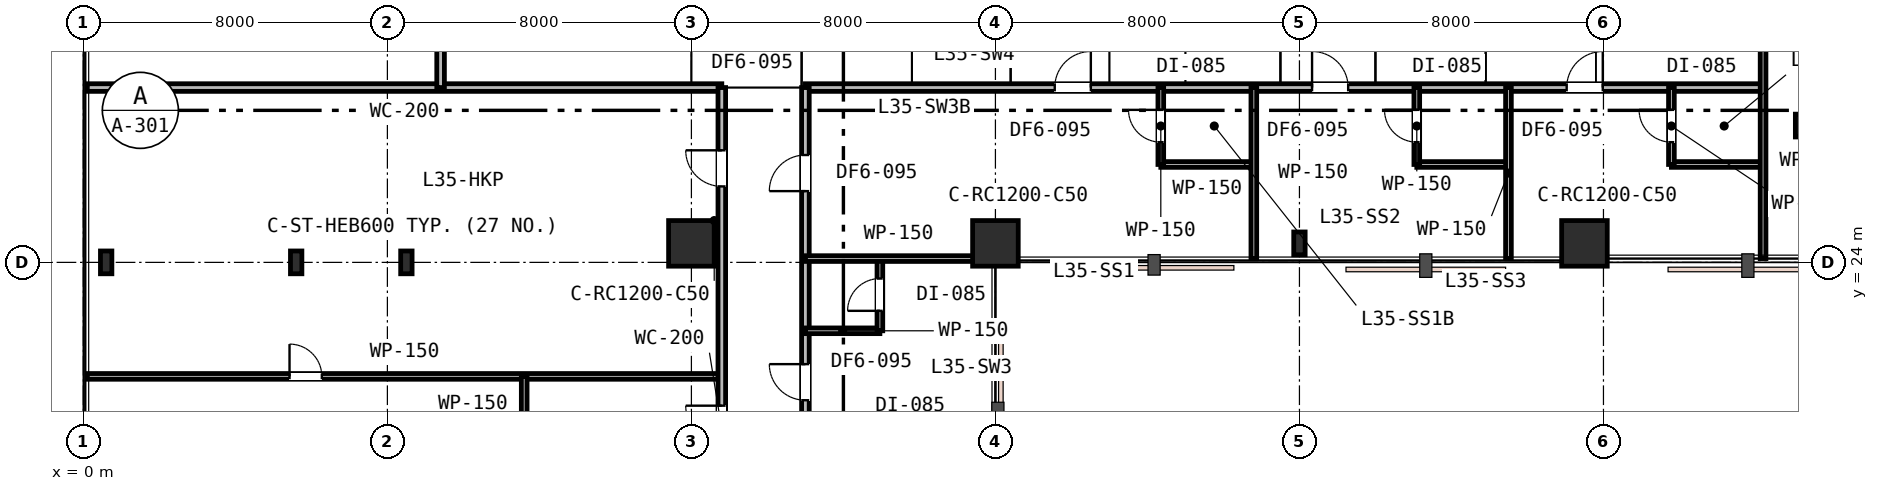
"""IFC4 building model, lengths in metres.
Left out: names, types, materials, properties, quantities, classifications, styles, units other than length and angle.
Written with IfcOpenShell. Run it as: python <this file> out.ifc"""

import sys

from ifc_helpers import new_model, si_unit, direction, frame, frame_2d, origin, origin_2d, place, context, subcontext, project, spatial, rectangle, i_section, extrude, element, fill, save


model = new_model("IFC4")
c1 = context("Model", 3, precision=1e-05, world=origin(), true_north=direction((0.0, 1.0)))
c2 = subcontext(c1, "Body", "Model", "MODEL_VIEW")
j1 = project(units=[si_unit("LENGTHUNIT", "METRE"), si_unit("PLANEANGLEUNIT", "RADIAN")], contexts=[c1])
p1 = place(None, origin())
s1 = spatial("IfcSite", under=j1, at=p1, CompositionType="ELEMENT")
p2 = place(p1, origin())
s2 = spatial("IfcBuilding", under=s1, at=p2, CompositionType="ELEMENT")
p3 = place(p2, frame((0.0, 0.0, 136.8)))
s3 = spatial("IfcBuildingStorey", under=s2, at=p3, CompositionType="ELEMENT", Elevation=136.8)
p4 = place(p3, frame((8.5, 24.0, 0.0), z_axis=(0.0, 0.0, 1.0), x_axis=(1.0, 0.0, 0.0)))
e1 = element("IfcColumn", 1, at=p4, inside=s3, PredefinedType="COLUMN", context=c2, shape_type="SweptSolid", body=[
    extrude(i_section(OverallWidth=0.3, OverallDepth=0.6, WebThickness=0.015, FlangeThickness=0.03, FilletRadius=0.027, at=origin_2d()), origin(), (0.0, 0.0, 1.0), 3.6),
])
for number, where, z_axis, x_axis in (
    (2, (16.0, 24.5, 0.0), (0.0, 0.0, 1.0), (1.0, 0.0, 0.0)),
    (3, (24.0, 24.5, 0.0), (0.0, 0.0, 1.0), (1.0, 0.0, 0.0)),
):
    element("IfcColumn", number, at=place(p3, frame(where, z_axis=z_axis, x_axis=x_axis)), inside=s3, PredefinedType="COLUMN", context=c2, shape_type="SweptSolid", body=[
        extrude(rectangle(XDim=1.2, YDim=1.2, at=origin_2d()), origin(), (0.0, 0.0, 1.0), 3.6),
    ])
p5 = place(p3, frame((32.0, 24.5, 0.0), z_axis=(0.0, 0.0, 1.0), x_axis=(1.0, 0.0, 0.0)))
e4 = element("IfcColumn", 4, at=p5, inside=s3, PredefinedType="COLUMN", context=c2, shape_type="SweptSolid", body=[
    extrude(i_section(OverallWidth=0.3, OverallDepth=0.6, WebThickness=0.015, FlangeThickness=0.03, FilletRadius=0.027, at=origin_2d()), origin(), (0.0, 0.0, 1.0), 3.6),
])
p6 = place(p3, frame((39.5, 24.5, 0.0), z_axis=(0.0, 0.0, 1.0), x_axis=(1.0, 0.0, 0.0)))
e5 = element("IfcColumn", 5, at=p6, inside=s3, PredefinedType="COLUMN", context=c2, shape_type="SweptSolid", body=[
    extrude(rectangle(XDim=1.2, YDim=1.2, at=origin_2d()), origin(), (0.0, 0.0, 1.0), 3.6),
])
for number, where, z_axis, x_axis in (
    (6, (5.6, 24.0, 0.0), (0.0, 0.0, 1.0), (1.0, 0.0, 0.0)),
    (7, (45.2, 27.6, 0.0), (0.0, 0.0, 1.0), (1.0, 0.0, 0.0)),
    (8, (0.6, 24.0, 0.0), (0.0, 0.0, 1.0), (1.0, 0.0, 0.0)),
):
    element("IfcColumn", number, at=place(p3, frame(where, z_axis=z_axis, x_axis=x_axis)), inside=s3, PredefinedType="COLUMN", context=c2, shape_type="SweptSolid", body=[
        extrude(i_section(OverallWidth=0.3, OverallDepth=0.6, WebThickness=0.015, FlangeThickness=0.03, FilletRadius=0.027, at=origin_2d()), origin(), (0.0, 0.0, 1.0), 3.6),
    ])
p7 = place(p3, frame((0.1, 28.6, 0.0), z_axis=(0.0, 0.0, 1.0), x_axis=(1.0, 0.0, 0.0)))
e9 = element("IfcWall", 9, at=p7, inside=s3, PredefinedType="PARTITIONING", context=c2, shape_type="SweptSolid", body=[
    extrude(rectangle(XDim=16.7, YDim=0.2, at=frame_2d((8.35, 0.0))), origin(), (0.0, 0.0, 1.0), 2.93),
])
p8 = place(p3, frame((19.0, 28.6, 0.0), z_axis=(0.0, 0.0, 1.0), x_axis=(1.0, 0.0, 0.0)))
e10 = element("IfcWall", 10, at=p8, inside=s3, PredefinedType="PARTITIONING", context=c2, shape_type="SweptSolid", body=[
    extrude(rectangle(XDim=25.2, YDim=0.2, at=frame_2d((12.6, 0.0))), origin(), (0.0, 0.0, 1.0), 2.93),
])
p9 = place(p8, frame((6.561, 0.0, 0.0)))
e11 = element("IfcOpeningElement", 11, at=p9, cuts=e10, PredefinedType="OPENING", context=c2, shape_type="SweptSolid", body=[
    extrude(rectangle(XDim=0.95, YDim=2.15, at=frame_2d((0.475, 1.075))), frame((0.0, 0.11, 0.0), z_axis=(0.0, -1.0, 0.0), x_axis=(1.0, 0.0, 0.0)), (0.0, 0.0, 1.0), 0.22),
])
p10 = place(p8, frame((13.332, 0.0, 0.0)))
e12 = element("IfcOpeningElement", 12, at=p10, cuts=e10, PredefinedType="OPENING", context=c2, shape_type="SweptSolid", body=[
    extrude(rectangle(XDim=0.95, YDim=2.15, at=frame_2d((0.475, 1.075))), frame((0.0, 0.11, 0.0), z_axis=(0.0, -1.0, 0.0), x_axis=(1.0, 0.0, 0.0)), (0.0, 0.0, 1.0), 0.22),
])
p11 = place(p8, frame((20.032, 0.0, 0.0)))
e13 = element("IfcOpeningElement", 13, at=p11, cuts=e10, PredefinedType="OPENING", context=c2, shape_type="SweptSolid", body=[
    extrude(rectangle(XDim=0.95, YDim=2.15, at=frame_2d((0.475, 1.075))), frame((0.0, 0.11, 0.0), z_axis=(0.0, -1.0, 0.0), x_axis=(1.0, 0.0, 0.0)), (0.0, 0.0, 1.0), 0.22),
])
p12 = place(p3, frame((0.1, 21.0, 0.0), z_axis=(0.0, 0.0, 1.0), x_axis=(1.0, 0.0, 0.0)))
e14 = element("IfcWall", 14, at=p12, inside=s3, PredefinedType="PARTITIONING", context=c2, shape_type="SweptSolid", body=[
    extrude(rectangle(XDim=16.7, YDim=0.15, at=frame_2d((8.35, 0.0))), origin(), (0.0, 0.0, 1.0), 2.93),
])
p13 = place(p12, frame((5.325, 0.0, 0.0)))
e15 = element("IfcOpeningElement", 15, at=p13, cuts=e14, PredefinedType="OPENING", context=c2, shape_type="SweptSolid", body=[
    extrude(rectangle(XDim=0.85, YDim=2.15, at=frame_2d((0.425, 1.075))), frame((0.0, 0.085, 0.0), z_axis=(0.0, -1.0, 0.0), x_axis=(1.0, 0.0, 0.0)), (0.0, 0.0, 1.0), 0.17),
])
p14 = place(p3, frame((11.6, 18.0, 0.0), z_axis=(0.0, 0.0, 1.0), x_axis=(0.0, 1.0, 0.0)))
e16 = element("IfcWall", 16, at=p14, inside=s3, PredefinedType="PARTITIONING", context=c2, shape_type="SweptSolid", body=[
    extrude(rectangle(XDim=3.0, YDim=0.15, at=frame_2d((1.5, 0.0))), origin(), (0.0, 0.0, 1.0), 2.93),
])
p15 = place(p3, frame((16.8, 10.6, 0.0), z_axis=(0.0, 0.0, 1.0), x_axis=(0.0, 1.0, 0.0)))
e17 = element("IfcWall", 17, at=p15, inside=s3, PredefinedType="PARTITIONING", context=c2, shape_type="SweptSolid", body=[
    extrude(rectangle(XDim=18.0, YDim=0.2, at=frame_2d((9.0, 0.0))), origin(), (0.0, 0.0, 1.0), 2.93),
])
p16 = place(p15, frame((8.679, 0.0, 0.0)))
e18 = element("IfcOpeningElement", 18, at=p16, cuts=e17, PredefinedType="OPENING", context=c2, shape_type="SweptSolid", body=[
    extrude(rectangle(XDim=0.95, YDim=2.15, at=frame_2d((0.475, 1.075))), frame((0.0, 0.11, 0.0), z_axis=(0.0, -1.0, 0.0), x_axis=(1.0, 0.0, 0.0)), (0.0, 0.0, 1.0), 0.22),
])
p17 = place(p15, frame((15.399, 0.0, 0.0)))
e19 = element("IfcOpeningElement", 19, at=p17, cuts=e17, PredefinedType="OPENING", context=c2, shape_type="SweptSolid", body=[
    extrude(rectangle(XDim=0.95, YDim=2.15, at=frame_2d((0.475, 1.075))), frame((0.0, 0.11, 0.0), z_axis=(0.0, -1.0, 0.0), x_axis=(1.0, 0.0, 0.0)), (0.0, 0.0, 1.0), 0.22),
])
p18 = place(p15, frame((4.273, 0.0, 0.0)))
e20 = element("IfcOpeningElement", 20, at=p18, cuts=e17, PredefinedType="OPENING", context=c2, shape_type="SweptSolid", body=[
    extrude(rectangle(XDim=0.95, YDim=2.15, at=frame_2d((0.475, 1.075))), frame((0.0, 0.11, 0.0), z_axis=(0.0, -1.0, 0.0), x_axis=(1.0, 0.0, 0.0)), (0.0, 0.0, 1.0), 0.22),
])
p19 = place(p3, frame((9.4, 28.6, 0.0), z_axis=(0.0, 0.0, 1.0), x_axis=(0.0, 1.0, 0.0)))
e21 = element("IfcWall", 21, at=p19, inside=s3, PredefinedType="PARTITIONING", context=c2, shape_type="SweptSolid", body=[
    extrude(rectangle(XDim=12.9, YDim=0.2, at=frame_2d((6.45, 0.0))), origin(), (0.0, 0.0, 1.0), 2.93),
])
p20 = place(p19, frame((3.383, 0.0, 0.0)))
e22 = element("IfcOpeningElement", 22, at=p20, cuts=e21, PredefinedType="OPENING", context=c2, shape_type="SweptSolid", body=[
    extrude(rectangle(XDim=0.95, YDim=2.15, at=frame_2d((0.475, 1.075))), frame((0.0, 0.11, 0.0), z_axis=(0.0, -1.0, 0.0), x_axis=(1.0, 0.0, 0.0)), (0.0, 0.0, 1.0), 0.22),
])
p21 = place(p19, frame((6.325, 0.0, 0.0)))
e23 = element("IfcOpeningElement", 23, at=p21, cuts=e21, PredefinedType="OPENING", context=c2, shape_type="SweptSolid", body=[
    extrude(rectangle(XDim=0.95, YDim=2.15, at=frame_2d((0.475, 1.075))), frame((0.0, 0.11, 0.0), z_axis=(0.0, -1.0, 0.0), x_axis=(1.0, 0.0, 0.0)), (0.0, 0.0, 1.0), 0.22),
])
p22 = place(p19, frame((10.375, 0.0, 0.0)))
e24 = element("IfcOpeningElement", 24, at=p22, cuts=e21, PredefinedType="OPENING", context=c2, shape_type="SweptSolid", body=[
    extrude(rectangle(XDim=0.95, YDim=2.15, at=frame_2d((0.475, 1.075))), frame((0.0, 0.11, 0.0), z_axis=(0.0, -1.0, 0.0), x_axis=(1.0, 0.0, 0.0)), (0.0, 0.0, 1.0), 0.22),
])
p23 = place(p3, frame((19.0, 10.6, 0.0), z_axis=(0.0, 0.0, 1.0), x_axis=(0.0, 1.0, 0.0)))
e25 = element("IfcWall", 25, at=p23, inside=s3, PredefinedType="PARTITIONING", context=c2, shape_type="SweptSolid", body=[
    extrude(rectangle(XDim=18.0, YDim=0.2, at=frame_2d((9.0, 0.0))), origin(), (0.0, 0.0, 1.0), 2.93),
])
p24 = place(p23, frame((0.772, 0.0, 0.0)))
e26 = element("IfcOpeningElement", 26, at=p24, cuts=e25, PredefinedType="OPENING", context=c2, shape_type="SweptSolid", body=[
    extrude(rectangle(XDim=0.95, YDim=2.15, at=frame_2d((0.475, 1.075))), frame((0.0, 0.11, 0.0), z_axis=(0.0, -1.0, 0.0), x_axis=(1.0, 0.0, 0.0)), (0.0, 0.0, 1.0), 0.22),
])
p25 = place(p23, frame((5.272, 0.0, 0.0)))
e27 = element("IfcOpeningElement", 27, at=p25, cuts=e25, PredefinedType="OPENING", context=c2, shape_type="SweptSolid", body=[
    extrude(rectangle(XDim=0.95, YDim=2.15, at=frame_2d((0.475, 1.075))), frame((0.0, 0.11, 0.0), z_axis=(0.0, -1.0, 0.0), x_axis=(1.0, 0.0, 0.0)), (0.0, 0.0, 1.0), 0.22),
])
p26 = place(p23, frame((9.773, 0.0, 0.0)))
e28 = element("IfcOpeningElement", 28, at=p26, cuts=e25, PredefinedType="OPENING", context=c2, shape_type="SweptSolid", body=[
    extrude(rectangle(XDim=0.95, YDim=2.15, at=frame_2d((0.475, 1.075))), frame((0.0, 0.11, 0.0), z_axis=(0.0, -1.0, 0.0), x_axis=(1.0, 0.0, 0.0)), (0.0, 0.0, 1.0), 0.22),
])
p27 = place(p23, frame((15.275, 0.0, 0.0)))
e29 = element("IfcOpeningElement", 29, at=p27, cuts=e25, PredefinedType="OPENING", context=c2, shape_type="SweptSolid", body=[
    extrude(rectangle(XDim=0.95, YDim=2.15, at=frame_2d((0.475, 1.075))), frame((0.0, 0.11, 0.0), z_axis=(0.0, -1.0, 0.0), x_axis=(1.0, 0.0, 0.0)), (0.0, 0.0, 1.0), 0.22),
])
p28 = place(p3, frame((19.0, 22.2, 0.0), z_axis=(0.0, 0.0, 1.0), x_axis=(1.0, 0.0, 0.0)))
e30 = element("IfcWall", 30, at=p28, inside=s3, PredefinedType="PARTITIONING", context=c2, shape_type="SweptSolid", body=[
    extrude(rectangle(XDim=1.96, YDim=0.15, at=frame_2d((0.98, 0.0))), origin(), (0.0, 0.0, 1.0), 3.33),
])
p29 = place(p3, frame((20.96, 22.2, 0.0), z_axis=(0.0, 0.0, 1.0), x_axis=(0.0, 1.0, 0.0)))
e31 = element("IfcWall", 31, at=p29, inside=s3, PredefinedType="PARTITIONING", context=c2, shape_type="SweptSolid", body=[
    extrude(rectangle(XDim=1.9, YDim=0.15, at=frame_2d((0.95, 0.0))), origin(), (0.0, 0.0, 1.0), 2.93),
])
p30 = place(p29, frame((0.525, 0.0, 0.0)))
e32 = element("IfcOpeningElement", 32, at=p30, cuts=e31, PredefinedType="OPENING", context=c2, shape_type="SweptSolid", body=[
    extrude(rectangle(XDim=0.85, YDim=2.15, at=frame_2d((0.425, 1.075))), frame((0.0, 0.085, 0.0), z_axis=(0.0, -1.0, 0.0), x_axis=(1.0, 0.0, 0.0)), (0.0, 0.0, 1.0), 0.17),
])
p31 = place(p3, frame((19.0, 24.1, 0.0), z_axis=(0.0, 0.0, 1.0), x_axis=(1.0, 0.0, 0.0)))
e33 = element("IfcWall", 33, at=p31, inside=s3, PredefinedType="PARTITIONING", context=c2, shape_type="SweptSolid", body=[
    extrude(rectangle(XDim=4.9, YDim=0.15, at=frame_2d((2.45, 0.0))), origin(), (0.0, 0.0, 1.0), 2.93),
])
p32 = place(p3, frame((28.352, 26.576, 0.0), z_axis=(0.0, 0.0, 1.0), x_axis=(1.0, 0.0, 0.0)))
e34 = element("IfcWall", 34, at=p32, inside=s3, PredefinedType="PARTITIONING", context=c2, shape_type="SweptSolid", body=[
    extrude(rectangle(XDim=2.448, YDim=0.15, at=frame_2d((1.224, 0.0))), origin(), (0.0, 0.0, 1.0), 3.33),
])
p33 = place(p3, frame((28.352, 26.576, 0.0), z_axis=(0.0, 0.0, 1.0), x_axis=(0.0, 1.0, 0.0)))
e35 = element("IfcWall", 35, at=p33, inside=s3, PredefinedType="PARTITIONING", context=c2, shape_type="SweptSolid", body=[
    extrude(rectangle(XDim=2.024, YDim=0.15, at=frame_2d((1.012, 0.0))), origin(), (0.0, 0.0, 1.0), 3.33),
])
p34 = place(p33, frame((0.587, 0.0, 0.0)))
e36 = element("IfcOpeningElement", 36, at=p34, cuts=e35, PredefinedType="OPENING", context=c2, shape_type="SweptSolid", body=[
    extrude(rectangle(XDim=0.85, YDim=2.15, at=frame_2d((0.425, 1.075))), frame((0.0, 0.085, 0.0), z_axis=(0.0, -1.0, 0.0), x_axis=(1.0, 0.0, 0.0)), (0.0, 0.0, 1.0), 0.17),
])
p35 = place(p3, frame((30.8, 28.6, 0.0), z_axis=(0.0, 0.0, 1.0), x_axis=(0.0, -1.0, 0.0)))
e37 = element("IfcWall", 37, at=p35, inside=s3, PredefinedType="PARTITIONING", context=c2, shape_type="SweptSolid", body=[
    extrude(rectangle(XDim=4.5, YDim=0.15, at=frame_2d((2.25, 0.0))), origin(), (0.0, 0.0, 1.0), 3.01),
])
p36 = place(p3, frame((35.088, 26.576, 0.0), z_axis=(0.0, 0.0, 1.0), x_axis=(1.0, 0.0, 0.0)))
e38 = element("IfcWall", 38, at=p36, inside=s3, PredefinedType="PARTITIONING", context=c2, shape_type="SweptSolid", body=[
    extrude(rectangle(XDim=2.412, YDim=0.15, at=frame_2d((1.206, 0.0))), origin(), (0.0, 0.0, 1.0), 2.96),
])
p37 = place(p3, frame((35.088, 26.576, 0.0), z_axis=(0.0, 0.0, 1.0), x_axis=(0.0, 1.0, 0.0)))
e39 = element("IfcWall", 39, at=p37, inside=s3, PredefinedType="PARTITIONING", context=c2, shape_type="SweptSolid", body=[
    extrude(rectangle(XDim=2.024, YDim=0.15, at=frame_2d((1.012, 0.0))), origin(), (0.0, 0.0, 1.0), 3.33),
])
p38 = place(p37, frame((0.587, 0.0, 0.0)))
e40 = element("IfcOpeningElement", 40, at=p38, cuts=e39, PredefinedType="OPENING", context=c2, shape_type="SweptSolid", body=[
    extrude(rectangle(XDim=0.85, YDim=2.15, at=frame_2d((0.425, 1.075))), frame((0.0, 0.085, 0.0), z_axis=(0.0, -1.0, 0.0), x_axis=(1.0, 0.0, 0.0)), (0.0, 0.0, 1.0), 0.17),
])
p39 = place(p3, frame((37.5, 28.6, 0.0), z_axis=(0.0, 0.0, 1.0), x_axis=(0.0, -1.0, 0.0)))
e41 = element("IfcWall", 41, at=p39, inside=s3, PredefinedType="PARTITIONING", context=c2, shape_type="SweptSolid", body=[
    extrude(rectangle(XDim=4.5, YDim=0.15, at=frame_2d((2.25, 0.0))), origin(), (0.0, 0.0, 1.0), 2.96),
])
p40 = place(p3, frame((41.788, 26.576, 0.0), z_axis=(0.0, 0.0, 1.0), x_axis=(1.0, 0.0, 0.0)))
e42 = element("IfcWall", 42, at=p40, inside=s3, PredefinedType="PARTITIONING", context=c2, shape_type="SweptSolid", body=[
    extrude(rectangle(XDim=2.412, YDim=0.15, at=frame_2d((1.206, 0.0))), origin(), (0.0, 0.0, 1.0), 3.33),
])
p41 = place(p3, frame((41.788, 26.576, 0.0), z_axis=(0.0, 0.0, 1.0), x_axis=(0.0, 1.0, 0.0)))
e43 = element("IfcWall", 43, at=p41, inside=s3, PredefinedType="PARTITIONING", context=c2, shape_type="SweptSolid", body=[
    extrude(rectangle(XDim=2.024, YDim=0.15, at=frame_2d((1.012, 0.0))), origin(), (0.0, 0.0, 1.0), 3.33),
])
p42 = place(p41, frame((0.587, 0.0, 0.0)))
e44 = element("IfcOpeningElement", 44, at=p42, cuts=e43, PredefinedType="OPENING", context=c2, shape_type="SweptSolid", body=[
    extrude(rectangle(XDim=0.85, YDim=2.15, at=frame_2d((0.425, 1.075))), frame((0.0, 0.085, 0.0), z_axis=(0.0, -1.0, 0.0), x_axis=(1.0, 0.0, 0.0)), (0.0, 0.0, 1.0), 0.17),
])
p43 = place(p3, frame((44.2, 30.8, 0.0), z_axis=(0.0, 0.0, 1.0), x_axis=(0.0, -1.0, 0.0)))
e45 = element("IfcWall", 45, at=p43, inside=s3, PredefinedType="PARTITIONING", context=c2, shape_type="SweptSolid", body=[
    extrude(rectangle(XDim=6.7, YDim=0.15, at=frame_2d((3.35, 0.0))), origin(), (0.0, 0.0, 1.0), 2.93),
])
p44 = place(p16, origin())
e46 = element("IfcDoor", 46, at=p44, inside=s3, OperationType="SINGLE_SWING_RIGHT", PredefinedType="DOOR", context=c2, shape_type="SweptSolid", body=[
    extrude(rectangle(XDim=0.95, YDim=2.15, at=frame_2d((0.475, 1.075))), frame((0.0, 0.025, 0.0), z_axis=(0.0, -1.0, 0.0), x_axis=(1.0, 0.0, 0.0)), (0.0, 0.0, 1.0), 0.05),
])
fill(e18, e46)
p45 = place(p13, origin())
e47 = element("IfcDoor", 47, at=p45, inside=s3, OperationType="SINGLE_SWING_LEFT", PredefinedType="DOOR", context=c2, shape_type="SweptSolid", body=[
    extrude(rectangle(XDim=0.85, YDim=2.15, at=frame_2d((0.425, 1.075))), frame((0.0, 0.025, 0.0), z_axis=(0.0, -1.0, 0.0), x_axis=(1.0, 0.0, 0.0)), (0.0, 0.0, 1.0), 0.05),
])
fill(e15, e47)
p46 = place(p17, origin())
e48 = element("IfcDoor", 48, at=p46, inside=s3, OperationType="SINGLE_SWING_RIGHT", PredefinedType="DOOR", context=c2, shape_type="SweptSolid", body=[
    extrude(rectangle(XDim=0.95, YDim=2.15, at=frame_2d((0.475, 1.075))), frame((0.0, 0.025, 0.0), z_axis=(0.0, -1.0, 0.0), x_axis=(1.0, 0.0, 0.0)), (0.0, 0.0, 1.0), 0.05),
])
fill(e19, e48)
p47 = place(p26, origin())
e49 = element("IfcDoor", 49, at=p47, inside=s3, OperationType="SINGLE_SWING_RIGHT", PredefinedType="DOOR", context=c2, shape_type="SweptSolid", body=[
    extrude(rectangle(XDim=0.95, YDim=2.15, at=frame_2d((0.475, 1.075))), frame((0.0, 0.025, 0.0), z_axis=(0.0, -1.0, 0.0), x_axis=(1.0, 0.0, 0.0)), (0.0, 0.0, 1.0), 0.05),
])
fill(e28, e49)
p48 = place(p30, origin())
e50 = element("IfcDoor", 50, at=p48, inside=s3, OperationType="SINGLE_SWING_LEFT", PredefinedType="DOOR", context=c2, shape_type="SweptSolid", body=[
    extrude(rectangle(XDim=0.85, YDim=2.15, at=frame_2d((0.425, 1.075))), frame((0.0, 0.025, 0.0), z_axis=(0.0, -1.0, 0.0), x_axis=(1.0, 0.0, 0.0)), (0.0, 0.0, 1.0), 0.05),
])
fill(e32, e50)
p49 = place(p27, origin())
e51 = element("IfcDoor", 51, at=p49, inside=s3, OperationType="SINGLE_SWING_LEFT", PredefinedType="DOOR", context=c2, shape_type="SweptSolid", body=[
    extrude(rectangle(XDim=0.95, YDim=2.15, at=frame_2d((0.475, 1.075))), frame((0.0, 0.025, 0.0), z_axis=(0.0, -1.0, 0.0), x_axis=(1.0, 0.0, 0.0)), (0.0, 0.0, 1.0), 0.05),
])
fill(e29, e51)
p50 = place(p9, origin())
e52 = element("IfcDoor", 52, at=p50, inside=s3, OperationType="SINGLE_SWING_RIGHT", PredefinedType="DOOR", context=c2, shape_type="SweptSolid", body=[
    extrude(rectangle(XDim=0.95, YDim=2.15, at=frame_2d((0.475, 1.075))), frame((0.0, 0.025, 0.0), z_axis=(0.0, -1.0, 0.0), x_axis=(1.0, 0.0, 0.0)), (0.0, 0.0, 1.0), 0.05),
])
fill(e11, e52)
p51 = place(p34, origin())
e53 = element("IfcDoor", 53, at=p51, inside=s3, OperationType="SINGLE_SWING_RIGHT", PredefinedType="DOOR", context=c2, shape_type="SweptSolid", body=[
    extrude(rectangle(XDim=0.85, YDim=2.15, at=frame_2d((0.425, 1.075))), frame((0.0, 0.025, 0.0), z_axis=(0.0, -1.0, 0.0), x_axis=(1.0, 0.0, 0.0)), (0.0, 0.0, 1.0), 0.05),
])
fill(e36, e53)
p52 = place(p10, origin())
e54 = element("IfcDoor", 54, at=p52, inside=s3, OperationType="SINGLE_SWING_LEFT", PredefinedType="DOOR", context=c2, shape_type="SweptSolid", body=[
    extrude(rectangle(XDim=0.95, YDim=2.15, at=frame_2d((0.475, 1.075))), frame((0.0, 0.025, 0.0), z_axis=(0.0, -1.0, 0.0), x_axis=(1.0, 0.0, 0.0)), (0.0, 0.0, 1.0), 0.05),
])
fill(e12, e54)
p53 = place(p38, origin())
e55 = element("IfcDoor", 55, at=p53, inside=s3, OperationType="SINGLE_SWING_RIGHT", PredefinedType="DOOR", context=c2, shape_type="SweptSolid", body=[
    extrude(rectangle(XDim=0.85, YDim=2.15, at=frame_2d((0.425, 1.075))), frame((0.0, 0.025, 0.0), z_axis=(0.0, -1.0, 0.0), x_axis=(1.0, 0.0, 0.0)), (0.0, 0.0, 1.0), 0.05),
])
fill(e40, e55)
p54 = place(p11, origin())
e56 = element("IfcDoor", 56, at=p54, inside=s3, OperationType="SINGLE_SWING_RIGHT", PredefinedType="DOOR", context=c2, shape_type="SweptSolid", body=[
    extrude(rectangle(XDim=0.95, YDim=2.15, at=frame_2d((0.475, 1.075))), frame((0.0, 0.025, 0.0), z_axis=(0.0, -1.0, 0.0), x_axis=(1.0, 0.0, 0.0)), (0.0, 0.0, 1.0), 0.05),
])
fill(e13, e56)
p55 = place(p42, origin())
e57 = element("IfcDoor", 57, at=p55, inside=s3, OperationType="SINGLE_SWING_RIGHT", PredefinedType="DOOR", context=c2, shape_type="SweptSolid", body=[
    extrude(rectangle(XDim=0.85, YDim=2.15, at=frame_2d((0.425, 1.075))), frame((0.0, 0.025, 0.0), z_axis=(0.0, -1.0, 0.0), x_axis=(1.0, 0.0, 0.0)), (0.0, 0.0, 1.0), 0.05),
])
fill(e44, e57)
save(model, sys.argv[1])
